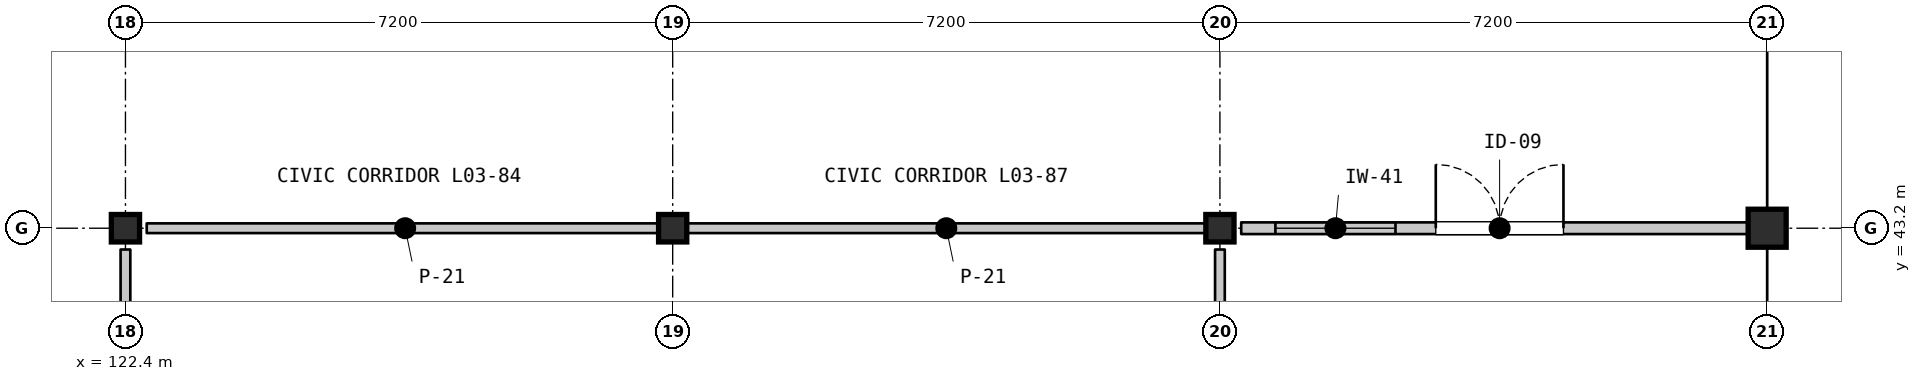
"""IFC4 building model, lengths in metres.
Left out: names, types, materials, properties, quantities, classifications, styles, units other than length and angle.
Written with IfcOpenShell. Run it as: python <this file> out.ifc"""

import sys

from ifc_helpers import new_model, si_unit, direction, frame, frame_2d, origin, origin_2d, place, context, subcontext, project, spatial, rectangle, i_section, extrude, element, fill, save


model = new_model("IFC4")
c1 = context("Model", 3, precision=1e-05, world=origin(), true_north=direction((0.0, 1.0)))
c2 = subcontext(c1, "Body", "Model", "MODEL_VIEW")
j1 = project(units=[si_unit("LENGTHUNIT", "METRE"), si_unit("PLANEANGLEUNIT", "RADIAN")], contexts=[c1])
p1 = place(None, origin())
s1 = spatial("IfcSite", under=j1, at=p1, CompositionType="ELEMENT")
p2 = place(p1, origin())
s2 = spatial("IfcBuilding", under=s1, at=p2, CompositionType="ELEMENT")
p3 = place(p2, frame((0.0, 0.0, 9.9)))
s3 = spatial("IfcBuildingStorey", under=s2, at=p3, CompositionType="ELEMENT", Elevation=9.9)
for number, where, z_axis, x_axis in (
    (1, (122.4, 43.2, 0.0), (0.0, 0.0, 1.0), (1.0, 0.0, 0.0)),
    (2, (129.6, 43.2, 0.0), (0.0, 0.0, 1.0), (1.0, 0.0, 0.0)),
    (3, (136.8, 43.2, 0.0), (0.0, 0.0, 1.0), (1.0, 0.0, 0.0)),
):
    element("IfcColumn", number, at=place(p3, frame(where, z_axis=z_axis, x_axis=x_axis)), inside=s3, PredefinedType="COLUMN", context=c2, shape_type="SweptSolid", body=[
        extrude(i_section(OverallWidth=0.371, OverallDepth=0.361, WebThickness=0.012, FlangeThickness=0.02, FilletRadius=0.015, at=origin_2d()), origin(), (0.0, 0.0, 1.0), 4.2),
    ])
p4 = place(p3, frame((144.0, 43.2, 0.0), z_axis=(0.0, 0.0, 1.0), x_axis=(1.0, 0.0, 0.0)))
e4 = element("IfcColumn", 4, at=p4, inside=s3, PredefinedType="COLUMN", context=c2, shape_type="SweptSolid", body=[
    extrude(rectangle(XDim=0.5, YDim=0.5, at=origin_2d()), origin(), (0.0, 0.0, 1.0), 4.2),
])
p5 = place(p3, frame((122.68, 43.2, 0.0), z_axis=(0.0, 0.0, 1.0), x_axis=(1.0, 0.0, 0.0)))
e5 = element("IfcWall", 5, at=p5, inside=s3, PredefinedType="PARTITIONING", context=c2, shape_type="SweptSolid", body=[
    extrude(rectangle(XDim=6.8, YDim=0.128, at=frame_2d((3.4, 0.0))), origin(), (0.0, 0.0, 1.0), 3.398),
])
p6 = place(p3, frame((129.72, 43.2, 0.0), z_axis=(0.0, 0.0, 1.0), x_axis=(1.0, 0.0, 0.0)))
e6 = element("IfcWall", 6, at=p6, inside=s3, PredefinedType="PARTITIONING", context=c2, shape_type="SweptSolid", body=[
    extrude(rectangle(XDim=6.96, YDim=0.128, at=frame_2d((3.48, 0.0))), origin(), (0.0, 0.0, 1.0), 3.398),
])
for number, where, z_axis, x_axis in (
    (7, (122.4, 36.12, 0.0), (0.0, 0.0, 1.0), (0.0, 1.0, 0.0)),
    (8, (136.8, 42.92, 0.0), (0.0, 0.0, 1.0), (0.0, -1.0, 0.0)),
):
    element("IfcWall", number, at=place(p3, frame(where, z_axis=z_axis, x_axis=x_axis)), inside=s3, PredefinedType="PARTITIONING", context=c2, shape_type="SweptSolid", body=[
        extrude(rectangle(XDim=6.8, YDim=0.128, at=frame_2d((3.4, 0.0))), origin(), (0.0, 0.0, 1.0), 3.378),
    ])
p7 = place(p3, frame((137.08, 43.2, 0.0), z_axis=(0.0, 0.0, 1.0), x_axis=(1.0, 0.0, 0.0)))
e9 = element("IfcWall", 9, at=p7, inside=s3, PredefinedType="PARTITIONING", context=c2, shape_type="SweptSolid", body=[
    extrude(rectangle(XDim=6.8, YDim=0.154, at=frame_2d((3.4, 0.0))), origin(), (0.0, 0.0, 1.0), 3.398),
])
p8 = place(p7, frame((2.56, 0.0, 0.0)))
e10 = element("IfcOpeningElement", 10, at=p8, cuts=e9, PredefinedType="OPENING", context=c2, shape_type="SweptSolid", body=[
    extrude(rectangle(XDim=1.68, YDim=2.35, at=frame_2d((0.84, 1.175))), frame((0.0, 0.087, 0.0), z_axis=(0.0, -1.0, 0.0), x_axis=(1.0, 0.0, 0.0)), (0.0, 0.0, 1.0), 0.174),
])
p9 = place(p7, frame((0.45, 0.0, 1.05)))
e11 = element("IfcOpeningElement", 11, at=p9, cuts=e9, PredefinedType="OPENING", context=c2, shape_type="SweptSolid", body=[
    extrude(rectangle(XDim=1.58, YDim=1.34, at=frame_2d((0.79, 0.67))), frame((0.0, 0.087, 0.0), z_axis=(0.0, -1.0, 0.0), x_axis=(1.0, 0.0, 0.0)), (0.0, 0.0, 1.0), 0.174),
])
p10 = place(p8, origin())
e12 = element("IfcDoor", 12, at=p10, inside=s3, OperationType="DOUBLE_DOOR_SINGLE_SWING", PredefinedType="DOOR", context=c2, shape_type="SweptSolid", body=[
    extrude(rectangle(XDim=1.68, YDim=2.35, at=frame_2d((0.84, 1.175))), frame((0.0, 0.025, 0.0), z_axis=(0.0, -1.0, 0.0), x_axis=(1.0, 0.0, 0.0)), (0.0, 0.0, 1.0), 0.05),
])
fill(e10, e12)
p11 = place(p9, origin())
e13 = element("IfcWindow", 13, at=p11, inside=s3, PartitioningType="SINGLE_PANEL", PredefinedType="WINDOW", context=c2, shape_type="SweptSolid", body=[
    extrude(rectangle(XDim=1.58, YDim=1.34, at=frame_2d((0.79, 0.67))), frame((0.0, 0.03, 0.0), z_axis=(0.0, -1.0, 0.0), x_axis=(1.0, 0.0, 0.0)), (0.0, 0.0, 1.0), 0.06),
])
fill(e11, e13)
save(model, sys.argv[1])
